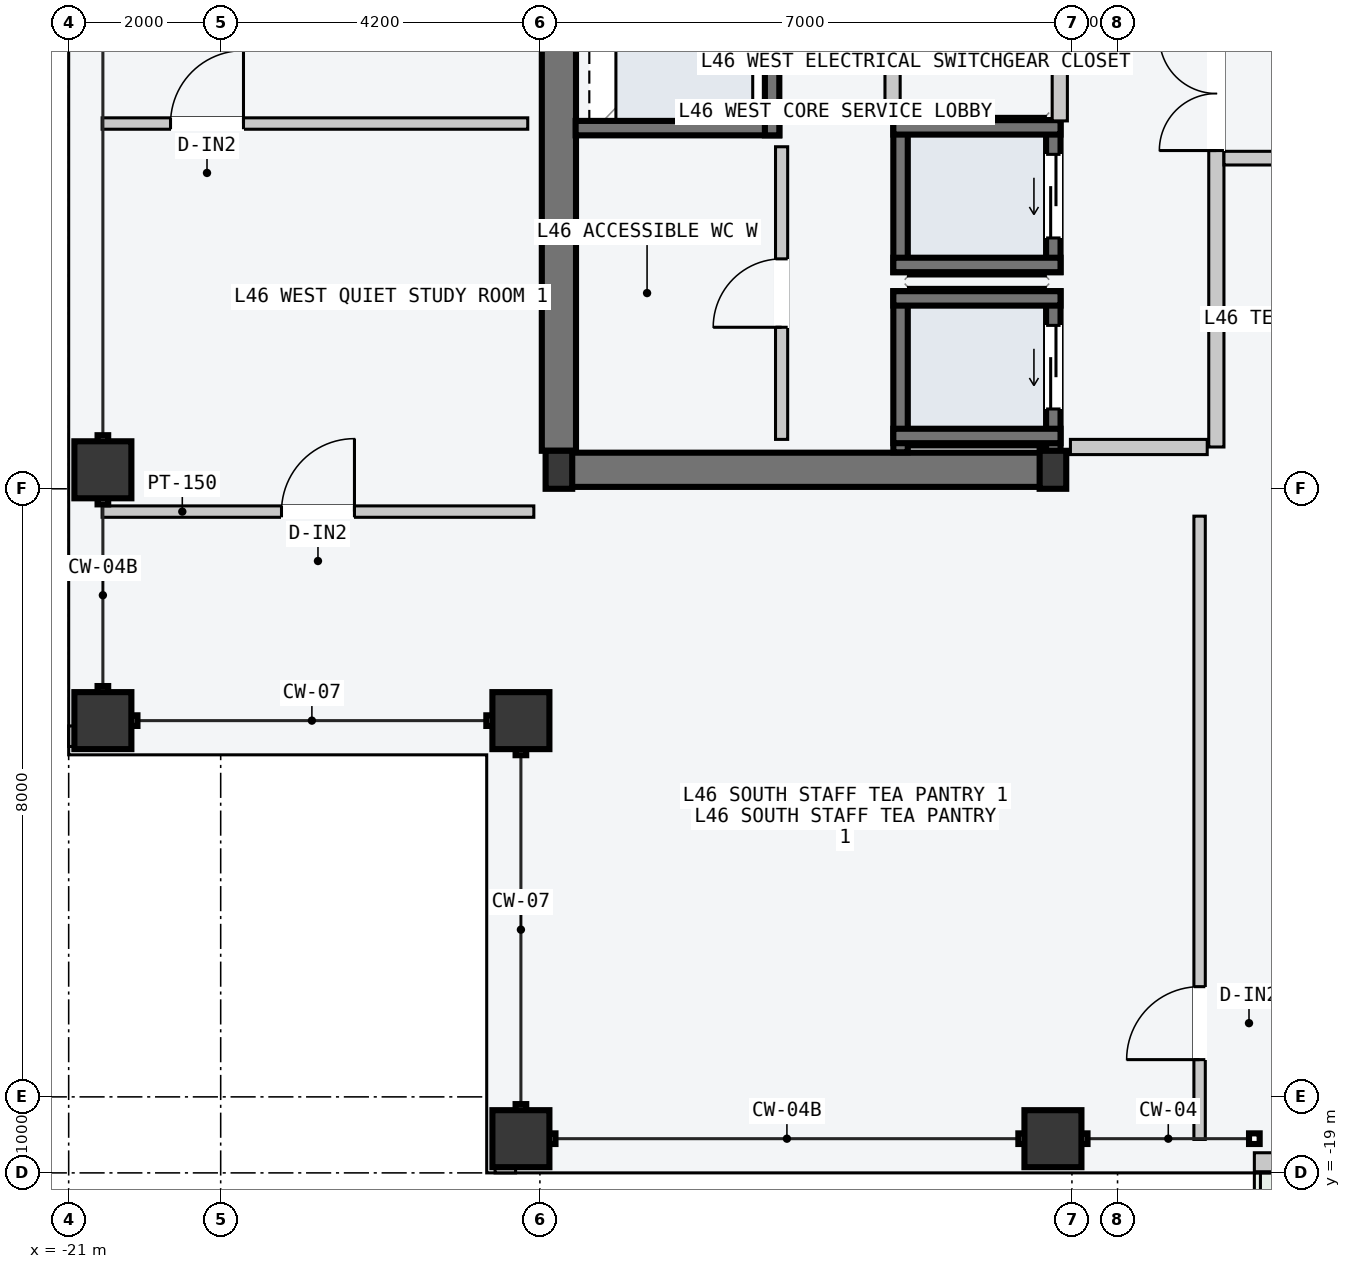
"""IFC4 building model, lengths in metres.
Left out: names, types, materials, properties, quantities, classifications, styles, units other than length and angle.
Written with IfcOpenShell. Run it as: python <this file> out.ifc"""

import sys

from ifc_helpers import new_model, si_unit, direction, frame, frame_2d, origin, origin_2d, place, context, subcontext, project, spatial, rectangle, hollow_rectangle, i_section, extrude, element, fill, save


model = new_model("IFC4")
c1 = context("Model", 3, precision=1e-05, world=origin(), true_north=direction((0.0, 1.0)))
c2 = subcontext(c1, "Body", "Model", "MODEL_VIEW")
j1 = project(units=[si_unit("LENGTHUNIT", "METRE"), si_unit("PLANEANGLEUNIT", "RADIAN")], contexts=[c1])
p1 = place(None, origin())
s1 = spatial("IfcSite", under=j1, at=p1, CompositionType="ELEMENT")
p2 = place(p1, origin())
s2 = spatial("IfcBuilding", under=s1, at=p2, CompositionType="ELEMENT")
p3 = place(p2, frame((0.0, 0.0, 176.7)))
s3 = spatial("IfcBuildingStorey", under=s2, at=p3, CompositionType="ELEMENT", Elevation=176.7)
p4 = place(p3, frame((-14.53, -9.75, -0.2), z_axis=(0.0, 0.0, 1.0), x_axis=(1.0, 0.0, 0.0)))
e1 = element("IfcWall", 1, at=p4, inside=s3, PredefinedType="SHEAR", context=c2, shape_type="SweptSolid", body=[
    extrude(rectangle(XDim=6.46, YDim=0.45, at=frame_2d((3.23, 0.0))), origin(), (0.0, 0.0, 1.0), 3.6),
])
p5 = place(p3, frame((-14.55, -9.5, -0.2), z_axis=(0.0, 0.0, 1.0), x_axis=(0.0, 1.0, 0.0)))
e2 = element("IfcWall", 2, at=p5, inside=s3, PredefinedType="SHEAR", context=c2, shape_type="SweptSolid", body=[
    extrude(rectangle(XDim=9.25, YDim=0.45, at=frame_2d((4.625, 0.0))), origin(), (0.0, 0.0, 1.0), 3.6),
])
for number, where, z_axis, x_axis in (
    (3, (-14.55, -9.75, 0.0), (0.0, 0.0, 1.0), (1.0, 0.0, 0.0)),
    (4, (-8.05, -9.75, 0.0), (0.0, 0.0, 1.0), (1.0, 0.0, 0.0)),
):
    element("IfcColumn", number, at=place(p3, frame(where, z_axis=z_axis, x_axis=x_axis)), inside=s3, PredefinedType="COLUMN", context=c2, shape_type="SweptSolid", body=[
        extrude(i_section(OverallWidth=0.35, OverallDepth=0.5, WebThickness=0.02, FlangeThickness=0.032, at=origin_2d()), origin(), (0.0, 0.0, 1.0), 3.6),
    ])
for number, where, z_axis, x_axis in (
    (5, (-15.05, -18.55, 0.0), (0.0, 0.0, 1.0), (1.0, 0.0, 0.0)),
    (6, (-8.05, -18.55, 0.0), (0.0, 0.0, 1.0), (1.0, 0.0, 0.0)),
    (7, (-20.55, -13.05, 0.0), (0.0, 0.0, 1.0), (0.0, 1.0, 0.0)),
    (8, (-20.55, -9.75, 0.0), (0.0, 0.0, 1.0), (0.0, 1.0, 0.0)),
    (9, (-15.05, -13.05, 0.0), (0.0, 0.0, 1.0), (1.0, 0.0, 0.0)),
):
    element("IfcColumn", number, at=place(p3, frame(where, z_axis=z_axis, x_axis=x_axis)), inside=s3, PredefinedType="COLUMN", context=c2, shape_type="SweptSolid", body=[
        extrude(hollow_rectangle(XDim=0.75, YDim=0.75, WallThickness=0.032, at=origin_2d()), origin(), (0.0, 0.0, 1.0), 3.6),
    ])
p6 = place(p3, frame((-5.4, -18.86, 0.0), z_axis=(0.0, 0.0, 1.0), x_axis=(1.0, 0.0, 0.0)))
e10 = element("IfcWall", 10, at=p6, inside=s3, PredefinedType="STANDARD", context=c2, shape_type="SweptSolid", body=[
    extrude(rectangle(XDim=10.8, YDim=0.25, at=frame_2d((5.4, 0.0))), origin(), (0.0, 0.0, 1.0), 3.4),
])
p7 = place(p6, frame((7.0, 0.0, 0.0)))
e11 = element("IfcOpeningElement", 11, at=p7, cuts=e10, PredefinedType="OPENING", context=c2, shape_type="SweptSolid", body=[
    extrude(rectangle(XDim=1.6, YDim=2.2, at=frame_2d((0.8, 1.1))), frame((0.0, 0.135, 0.0), z_axis=(0.0, -1.0, 0.0), x_axis=(1.0, 0.0, 0.0)), (0.0, 0.0, 1.0), 0.27),
])
p8 = place(p6, frame((1.8, 0.0, 0.85)))
e12 = element("IfcOpeningElement", 12, at=p8, cuts=e10, PredefinedType="OPENING", context=c2, shape_type="SweptSolid", body=[
    extrude(rectangle(XDim=2.0, YDim=2.1, at=frame_2d((1.0, 1.05))), frame((0.0, 0.135, 0.0), z_axis=(0.0, -1.0, 0.0), x_axis=(1.0, 0.0, 0.0)), (0.0, 0.0, 1.0), 0.27),
])
for number, where, z_axis, x_axis in (
    (13, (-15.39, -18.89, 0.0), (0.0, 0.0, 1.0), (1.0, 0.0, 0.0)),
    (14, (-20.89, -13.39, 0.0), (0.0, 0.0, 1.0), (0.0, 1.0, 0.0)),
):
    element("IfcWall", number, at=place(p3, frame(where, z_axis=z_axis, x_axis=x_axis)), inside=s3, PredefinedType="PARAPET", context=c2, shape_type="SweptSolid", body=[
        extrude(rectangle(XDim=0.27, YDim=0.22, at=frame_2d((0.135, 0.0))), origin(), (0.0, 0.0, 1.0), 1.2),
    ])
p9 = place(p3, frame((-8.045, -9.52, -0.2), z_axis=(0.0, 0.0, 1.0), x_axis=(0.0, 1.0, 0.0)))
e15 = element("IfcWall", 15, at=p9, inside=s3, PredefinedType="SOLIDWALL", context=c2, shape_type="SweptSolid", body=[
    extrude(rectangle(XDim=2.12, YDim=0.19, at=frame_2d((1.06, 0.0))), origin(), (0.0, 0.0, 1.0), 3.6),
])
p10 = place(p9, frame((0.57, 0.0, 0.2)))
e16 = element("IfcOpeningElement", 16, at=p10, cuts=e15, PredefinedType="OPENING", context=c2, shape_type="SweptSolid", body=[
    extrude(rectangle(XDim=1.1, YDim=2.2, at=frame_2d((0.55, 1.1))), frame((0.0, 0.105, 0.0), z_axis=(0.0, -1.0, 0.0), x_axis=(1.0, 0.0, 0.0)), (0.0, 0.0, 1.0), 0.21),
])
p11 = place(p3, frame((-10.055, -9.52, -0.2), z_axis=(0.0, 0.0, 1.0), x_axis=(0.0, 1.0, 0.0)))
e17 = element("IfcWall", 17, at=p11, inside=s3, PredefinedType="SOLIDWALL", context=c2, shape_type="SweptSolid", body=[
    extrude(rectangle(XDim=2.12, YDim=0.19, at=frame_2d((1.06, 0.0))), origin(), (0.0, 0.0, 1.0), 3.6),
])
for number, where, z_axis, x_axis in (
    (18, (-10.15, -7.495, -0.2), (0.0, 0.0, 1.0), (1.0, 0.0, 0.0)),
    (19, (-10.15, -9.305, -0.2), (0.0, 0.0, 1.0), (1.0, 0.0, 0.0)),
):
    element("IfcWall", number, at=place(p3, frame(where, z_axis=z_axis, x_axis=x_axis)), inside=s3, PredefinedType="SOLIDWALL", context=c2, shape_type="SweptSolid", body=[
        extrude(rectangle(XDim=2.2, YDim=0.19, at=frame_2d((1.1, 0.0))), origin(), (0.0, 0.0, 1.0), 3.6),
    ])
p12 = place(p3, frame((-8.045, -7.15, -0.2), z_axis=(0.0, 0.0, 1.0), x_axis=(0.0, 1.0, 0.0)))
e20 = element("IfcWall", 20, at=p12, inside=s3, PredefinedType="SOLIDWALL", context=c2, shape_type="SweptSolid", body=[
    extrude(rectangle(XDim=2.0, YDim=0.19, at=frame_2d((1.0, 0.0))), origin(), (0.0, 0.0, 1.0), 3.6),
])
p13 = place(p12, frame((0.45, 0.0, 0.2)))
e21 = element("IfcOpeningElement", 21, at=p13, cuts=e20, PredefinedType="OPENING", context=c2, shape_type="SweptSolid", body=[
    extrude(rectangle(XDim=1.1, YDim=2.2, at=frame_2d((0.55, 1.1))), frame((0.0, 0.105, 0.0), z_axis=(0.0, -1.0, 0.0), x_axis=(1.0, 0.0, 0.0)), (0.0, 0.0, 1.0), 0.21),
])
p14 = place(p3, frame((-10.055, -7.15, -0.2), z_axis=(0.0, 0.0, 1.0), x_axis=(0.0, 1.0, 0.0)))
e22 = element("IfcWall", 22, at=p14, inside=s3, PredefinedType="SOLIDWALL", context=c2, shape_type="SweptSolid", body=[
    extrude(rectangle(XDim=2.0, YDim=0.19, at=frame_2d((1.0, 0.0))), origin(), (0.0, 0.0, 1.0), 3.6),
])
for number, where, z_axis, x_axis in (
    (23, (-10.15, -5.245, -0.2), (0.0, 0.0, 1.0), (1.0, 0.0, 0.0)),
    (24, (-10.15, -7.055, -0.2), (0.0, 0.0, 1.0), (1.0, 0.0, 0.0)),
):
    element("IfcWall", number, at=place(p3, frame(where, z_axis=z_axis, x_axis=x_axis)), inside=s3, PredefinedType="SOLIDWALL", context=c2, shape_type="SweptSolid", body=[
        extrude(rectangle(XDim=2.2, YDim=0.19, at=frame_2d((1.1, 0.0))), origin(), (0.0, 0.0, 1.0), 3.6),
    ])
p15 = place(p3, frame((-14.33, -5.255, -0.2), z_axis=(0.0, 0.0, 1.0), x_axis=(1.0, 0.0, 0.0)))
e25 = element("IfcWall", 25, at=p15, inside=s3, PredefinedType="SOLIDWALL", context=c2, shape_type="SweptSolid", body=[
    extrude(rectangle(XDim=2.68, YDim=0.19, at=frame_2d((1.34, 0.0))), origin(), (0.0, 0.0, 1.0), 3.6),
])
p16 = place(p3, frame((-11.745, -5.35, -0.2), z_axis=(0.0, 0.0, 1.0), x_axis=(0.0, 1.0, 0.0)))
e26 = element("IfcWall", 26, at=p16, inside=s3, PredefinedType="SOLIDWALL", context=c2, shape_type="SweptSolid", body=[
    extrude(rectangle(XDim=2.6, YDim=0.19, at=frame_2d((1.3, 0.0))), origin(), (0.0, 0.0, 1.0), 3.6),
])
p17 = place(p3, frame((-5.9, -9.45, 0.0), z_axis=(0.0, 0.0, 1.0), x_axis=(0.0, 1.0, 0.0)))
e27 = element("IfcWall", 27, at=p17, inside=s3, PredefinedType="PARTITIONING", context=c2, shape_type="SweptSolid", body=[
    extrude(rectangle(XDim=10.5, YDim=0.2, at=frame_2d((5.25, 0.0))), origin(), (0.0, 0.0, 1.0), 3.4),
])
p18 = place(p17, frame((3.9, 0.0, 0.0)))
e28 = element("IfcOpeningElement", 28, at=p18, cuts=e27, PredefinedType="OPENING", context=c2, shape_type="SweptSolid", body=[
    extrude(rectangle(XDim=1.5, YDim=2.2, at=frame_2d((0.75, 1.1))), frame((0.0, 0.11, 0.0), z_axis=(0.0, -1.0, 0.0), x_axis=(1.0, 0.0, 0.0)), (0.0, 0.0, 1.0), 0.22),
])
p19 = place(p3, frame((-6.02, -9.45, 0.0), z_axis=(0.0, 0.0, 1.0), x_axis=(-1.0, 0.0, 0.0)))
e29 = element("IfcWall", 29, at=p19, inside=s3, PredefinedType="PARTITIONING", context=c2, shape_type="SweptSolid", body=[
    extrude(rectangle(XDim=1.8, YDim=0.2, at=frame_2d((0.9, 0.0))), origin(), (0.0, 0.0, 1.0), 3.4),
])
for number, where, z_axis, x_axis in (
    (30, (-7.96, -5.16, 0.0), (0.0, 0.0, 1.0), (0.0, 1.0, 0.0)),
    (31, (-10.16, -5.16, 0.0), (0.0, 0.0, 1.0), (0.0, 1.0, 0.0)),
):
    element("IfcWall", number, at=place(p3, frame(where, z_axis=z_axis, x_axis=x_axis)), inside=s3, PredefinedType="PARTITIONING", context=c2, shape_type="SweptSolid", body=[
        extrude(rectangle(XDim=2.44, YDim=0.2, at=frame_2d((1.22, 0.0))), origin(), (0.0, 0.0, 1.0), 3.4),
    ])
p20 = place(p3, frame((-11.62, -9.35, 0.0), z_axis=(0.0, 0.0, 1.0), x_axis=(0.0, 1.0, 0.0)))
e32 = element("IfcWall", 32, at=p20, inside=s3, PredefinedType="PARTITIONING", context=c2, shape_type="SweptSolid", body=[
    extrude(rectangle(XDim=3.85, YDim=0.16, at=frame_2d((1.925, 0.0))), origin(), (0.0, 0.0, 1.0), 3.4),
])
p21 = place(p20, frame((1.475, 0.0, 0.0)))
e33 = element("IfcOpeningElement", 33, at=p21, cuts=e32, PredefinedType="OPENING", context=c2, shape_type="SweptSolid", body=[
    extrude(rectangle(XDim=0.9, YDim=2.15, at=frame_2d((0.45, 1.075))), frame((0.0, 0.09, 0.0), z_axis=(0.0, -1.0, 0.0), x_axis=(1.0, 0.0, 0.0)), (0.0, 0.0, 1.0), 0.18),
])
p22 = place(p3, frame((-5.8, -5.65, 0.0), z_axis=(0.0, 0.0, 1.0), x_axis=(1.0, 0.0, 0.0)))
e34 = element("IfcWall", 34, at=p22, inside=s3, PredefinedType="PARTITIONING", context=c2, shape_type="SweptSolid", body=[
    extrude(rectangle(XDim=4.54, YDim=0.18, at=frame_2d((2.27, 0.0))), origin(), (0.0, 0.0, 1.0), 3.4),
])
p23 = place(p3, frame((-6.12, -18.56, 0.0), z_axis=(0.0, 0.0, 1.0), x_axis=(0.0, 1.0, 0.0)))
e35 = element("IfcWall", 35, at=p23, inside=s3, PredefinedType="PARTITIONING", context=c2, shape_type="SweptSolid", body=[
    extrude(rectangle(XDim=8.2, YDim=0.15, at=frame_2d((4.1, 0.0))), origin(), (0.0, 0.0, 1.0), 3.4),
])
p24 = place(p23, frame((1.05, 0.0, 0.0)))
e36 = element("IfcOpeningElement", 36, at=p24, cuts=e35, PredefinedType="OPENING", context=c2, shape_type="SweptSolid", body=[
    extrude(rectangle(XDim=0.96, YDim=2.18, at=frame_2d((0.48, 1.09))), frame((0.0, 0.085, 0.0), z_axis=(0.0, -1.0, 0.0), x_axis=(1.0, 0.0, 0.0)), (0.0, 0.0, 1.0), 0.17),
])
p25 = place(p3, frame((-20.56, -10.3, 0.0), z_axis=(0.0, 0.0, 1.0), x_axis=(1.0, 0.0, 0.0)))
e37 = element("IfcWall", 37, at=p25, inside=s3, PredefinedType="PARTITIONING", context=c2, shape_type="SweptSolid", body=[
    extrude(rectangle(XDim=5.68, YDim=0.15, at=frame_2d((2.84, 0.0))), origin(), (0.0, 0.0, 1.0), 3.4),
])
p26 = place(p25, frame((2.36, 0.0, 0.0)))
e38 = element("IfcOpeningElement", 38, at=p26, cuts=e37, PredefinedType="OPENING", context=c2, shape_type="SweptSolid", body=[
    extrude(rectangle(XDim=0.96, YDim=2.18, at=frame_2d((0.48, 1.09))), frame((0.0, 0.085, 0.0), z_axis=(0.0, -1.0, 0.0), x_axis=(1.0, 0.0, 0.0)), (0.0, 0.0, 1.0), 0.17),
])
p27 = place(p3, frame((-20.56, -5.195, 0.0), z_axis=(0.0, 0.0, 1.0), x_axis=(1.0, 0.0, 0.0)))
e39 = element("IfcWall", 39, at=p27, inside=s3, PredefinedType="PARTITIONING", context=c2, shape_type="SweptSolid", body=[
    extrude(rectangle(XDim=5.6, YDim=0.15, at=frame_2d((2.8, 0.0))), origin(), (0.0, 0.0, 1.0), 3.4),
])
p28 = place(p27, frame((0.9, 0.0, 0.0)))
e40 = element("IfcOpeningElement", 40, at=p28, cuts=e39, PredefinedType="OPENING", context=c2, shape_type="SweptSolid", body=[
    extrude(rectangle(XDim=0.96, YDim=2.18, at=frame_2d((0.48, 1.09))), frame((0.0, 0.085, 0.0), z_axis=(0.0, -1.0, 0.0), x_axis=(1.0, 0.0, 0.0)), (0.0, 0.0, 1.0), 0.17),
])
p29 = place(p10, origin())
e41 = element("IfcDoor", 41, at=p29, inside=s3, OperationType="SLIDING_TO_LEFT", PredefinedType="DOOR", context=c2, shape_type="SweptSolid", body=[
    extrude(rectangle(XDim=1.1, YDim=2.2, at=frame_2d((0.55, 1.1))), frame((0.0, 0.025, 0.0), z_axis=(0.0, -1.0, 0.0), x_axis=(1.0, 0.0, 0.0)), (0.0, 0.0, 1.0), 0.05),
])
fill(e16, e41)
p30 = place(p13, origin())
e42 = element("IfcDoor", 42, at=p30, inside=s3, OperationType="SLIDING_TO_LEFT", PredefinedType="DOOR", context=c2, shape_type="SweptSolid", body=[
    extrude(rectangle(XDim=1.1, YDim=2.2, at=frame_2d((0.55, 1.1))), frame((0.0, 0.025, 0.0), z_axis=(0.0, -1.0, 0.0), x_axis=(1.0, 0.0, 0.0)), (0.0, 0.0, 1.0), 0.05),
])
fill(e21, e42)
p31 = place(p18, origin())
e43 = element("IfcDoor", 43, at=p31, inside=s3, OperationType="DOUBLE_DOOR_SINGLE_SWING", PredefinedType="DOOR", context=c2, shape_type="SweptSolid", body=[
    extrude(rectangle(XDim=1.5, YDim=2.2, at=frame_2d((0.75, 1.1))), frame((0.0, 0.025, 0.0), z_axis=(0.0, -1.0, 0.0), x_axis=(1.0, 0.0, 0.0)), (0.0, 0.0, 1.0), 0.05),
])
fill(e28, e43)
p32 = place(p21, origin())
e44 = element("IfcDoor", 44, at=p32, inside=s3, OperationType="SINGLE_SWING_LEFT", PredefinedType="DOOR", context=c2, shape_type="SweptSolid", body=[
    extrude(rectangle(XDim=0.9, YDim=2.15, at=frame_2d((0.45, 1.075))), frame((0.0, 0.025, 0.0), z_axis=(0.0, -1.0, 0.0), x_axis=(1.0, 0.0, 0.0)), (0.0, 0.0, 1.0), 0.05),
])
fill(e33, e44)
p33 = place(p24, origin())
e45 = element("IfcDoor", 45, at=p33, inside=s3, OperationType="SINGLE_SWING_LEFT", PredefinedType="DOOR", context=c2, shape_type="SweptSolid", body=[
    extrude(rectangle(XDim=0.96, YDim=2.18, at=frame_2d((0.48, 1.09))), frame((0.0, 0.025, 0.0), z_axis=(0.0, -1.0, 0.0), x_axis=(1.0, 0.0, 0.0)), (0.0, 0.0, 1.0), 0.05),
])
fill(e36, e45)
p34 = place(p26, origin())
e46 = element("IfcDoor", 46, at=p34, inside=s3, OperationType="SINGLE_SWING_RIGHT", PredefinedType="DOOR", context=c2, shape_type="SweptSolid", body=[
    extrude(rectangle(XDim=0.96, YDim=2.18, at=frame_2d((0.48, 1.09))), frame((0.0, 0.025, 0.0), z_axis=(0.0, -1.0, 0.0), x_axis=(1.0, 0.0, 0.0)), (0.0, 0.0, 1.0), 0.05),
])
fill(e38, e46)
p35 = place(p28, origin())
e47 = element("IfcDoor", 47, at=p35, inside=s3, OperationType="SINGLE_SWING_RIGHT", PredefinedType="DOOR", context=c2, shape_type="SweptSolid", body=[
    extrude(rectangle(XDim=0.96, YDim=2.18, at=frame_2d((0.48, 1.09))), frame((0.0, 0.025, 0.0), z_axis=(0.0, -1.0, 0.0), x_axis=(1.0, 0.0, 0.0)), (0.0, 0.0, 1.0), 0.05),
])
fill(e40, e47)
save(model, sys.argv[1])
